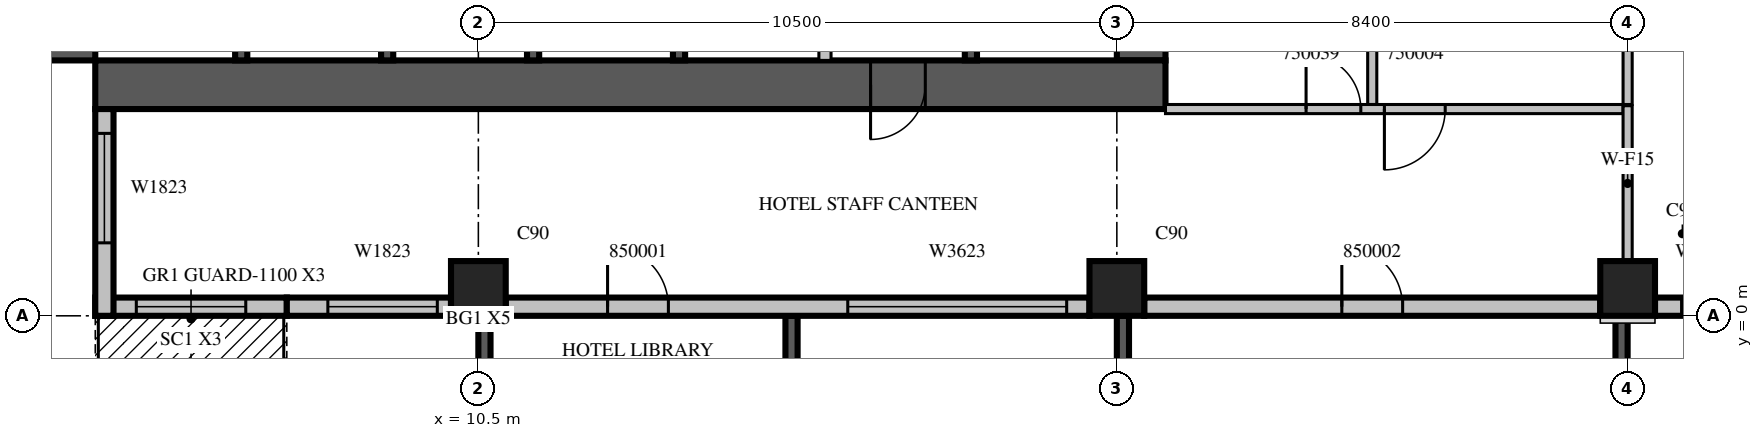
"""IFC4 building model, lengths in metres.
Left out: names, types, materials, properties, quantities, classifications, styles, units other than length and angle.
Written with IfcOpenShell. Run it as: python <this file> out.ifc"""

import sys

from ifc_helpers import new_model, si_unit, direction, frame, frame_2d, origin, origin_2d, place, context, subcontext, project, spatial, rectangle, extrude, source, transform, mapped, element, fill, save


model = new_model("IFC4")
c1 = context("Model", 3, precision=1e-05, world=origin(), true_north=direction((0.0, 1.0)))
c2 = subcontext(c1, "Body", "Model", "MODEL_VIEW")
j1 = project(units=[si_unit("LENGTHUNIT", "METRE"), si_unit("PLANEANGLEUNIT", "RADIAN")], contexts=[c1])
p1 = place(None, origin())
s1 = spatial("IfcSite", under=j1, at=p1, CompositionType="ELEMENT")
p2 = place(p1, origin())
s2 = spatial("IfcBuilding", under=s1, at=p2, CompositionType="ELEMENT")
p3 = place(p2, frame((0.0, 0.0, 223.4)))
s3 = spatial("IfcBuildingStorey", under=s2, at=p3, CompositionType="ELEMENT", Elevation=223.4)
m1 = source(origin(), c2, "Body", "SweptSolid", [
    extrude(rectangle(XDim=0.9, YDim=0.9, at=origin_2d()), origin(), (0.0, 0.0, 1.0), 3.8),
])
for number, where, z_axis, x_axis in (
    (1, (10.5, 0.45, 0.0), (0.0, 0.0, 1.0), (1.0, 0.0, 0.0)),
    (2, (21.0, 0.45, 0.0), (0.0, 0.0, 1.0), (1.0, 0.0, 0.0)),
    (3, (29.4, 0.45, 0.0), (0.0, 0.0, 1.0), (1.0, 0.0, 0.0)),
):
    element("IfcColumn", number, at=place(p3, frame(where, z_axis=z_axis, x_axis=x_axis)), inside=s3, PredefinedType="COLUMN", context=c2, shape_type="MappedRepresentation", body=[
        mapped(m1, transform((0.0, 0.0, 0.0), scale=1.0)),
    ])
m2 = source(origin(), c2, "Body", "SweptSolid", [
    extrude(rectangle(XDim=17.6, YDim=0.8, at=frame_2d((8.8, 0.0))), origin(), (0.0, 0.0, 1.0), 3.8),
])
p4 = place(p3, frame((3.8, 4.2, 0.0), z_axis=(0.0, 0.0, 1.0), x_axis=(0.0, 1.0, 0.0)))
e4 = element("IfcWall", 4, at=p4, inside=s3, PredefinedType="SHEAR", context=c2, shape_type="MappedRepresentation", body=[
    mapped(m2, transform((0.0, 0.0, 0.0), scale=1.0)),
])
m3 = source(origin(), c2, "Body", "SweptSolid", [
    extrude(rectangle(XDim=2.2, YDim=2.1, at=frame_2d((1.1, 1.05))), frame((0.0, 0.41, 0.0), z_axis=(0.0, -1.0, 0.0), x_axis=(1.0, 0.0, 0.0)), (0.0, 0.0, 1.0), 0.82),
])
p5 = place(p4, frame((4.2, 0.0, 0.0)))
e5 = element("IfcOpeningElement", 5, at=p5, cuts=e4, PredefinedType="OPENING", context=c2, shape_type="MappedRepresentation", body=[
    mapped(m3, transform((0.0, 0.0, 0.0), scale=1.0)),
])
m4 = source(origin(), c2, "Body", "SweptSolid", [
    extrude(rectangle(XDim=0.9, YDim=2.1, at=frame_2d((0.45, 1.05))), frame((0.0, 0.41, 0.0), z_axis=(0.0, -1.0, 0.0), x_axis=(1.0, 0.0, 0.0)), (0.0, 0.0, 1.0), 0.82),
])
p6 = place(p4, frame((10.95, 0.0, 0.0)))
e6 = element("IfcOpeningElement", 6, at=p6, cuts=e4, PredefinedType="OPENING", context=c2, shape_type="MappedRepresentation", body=[
    mapped(m4, transform((0.0, 0.0, 0.0), scale=1.0)),
])
m5 = source(origin(), c2, "Body", "SweptSolid", [
    extrude(rectangle(XDim=16.8, YDim=0.8, at=frame_2d((8.4, 0.0))), origin(), (0.0, 0.0, 1.0), 3.8),
])
p7 = place(p3, frame((21.4, 4.2, 0.0), z_axis=(0.0, 0.0, 1.0), x_axis=(0.0, 1.0, 0.0)))
e7 = element("IfcWall", 7, at=p7, inside=s3, PredefinedType="SHEAR", context=c2, shape_type="MappedRepresentation", body=[
    mapped(m5, transform((0.0, 0.0, 0.0), scale=1.0)),
])
p8 = place(p7, frame((4.2, 0.0, 0.0)))
e8 = element("IfcOpeningElement", 8, at=p8, cuts=e7, PredefinedType="OPENING", context=c2, shape_type="MappedRepresentation", body=[
    mapped(m3, transform((0.0, 0.0, 0.0), scale=1.0)),
])
m6 = source(origin(), c2, "Body", "SweptSolid", [
    extrude(rectangle(XDim=1.2, YDim=2.1, at=frame_2d((0.6, 1.05))), frame((0.0, 0.41, 0.0), z_axis=(0.0, -1.0, 0.0), x_axis=(1.0, 0.0, 0.0)), (0.0, 0.0, 1.0), 0.82),
])
p9 = place(p7, frame((14.7, 0.0, 0.0)))
e9 = element("IfcOpeningElement", 9, at=p9, cuts=e7, PredefinedType="OPENING", context=c2, shape_type="MappedRepresentation", body=[
    mapped(m6, transform((0.0, 0.0, 0.0), scale=1.0)),
])
p10 = place(p3, frame((4.2, 3.8, 0.0), z_axis=(0.0, 0.0, 1.0), x_axis=(1.0, 0.0, 0.0)))
e10 = element("IfcWall", 10, at=p10, inside=s3, PredefinedType="SHEAR", context=c2, shape_type="MappedRepresentation", body=[
    mapped(m2, transform((0.0, 0.0, 0.0), scale=1.0)),
])
p11 = place(p10, frame((12.75, 0.0, 0.0)))
e11 = element("IfcOpeningElement", 11, at=p11, cuts=e10, PredefinedType="OPENING", context=c2, shape_type="MappedRepresentation", body=[
    mapped(m4, transform((0.0, 0.0, 0.0), scale=1.0)),
])
m7 = source(origin(), c2, "Body", "SweptSolid", [
    extrude(rectangle(XDim=3.9, YDim=0.2, at=frame_2d((1.95, 0.0))), origin(), (0.0, 0.0, 1.0), 3.4),
])
p12 = place(p3, frame((10.6, 0.0, 0.0), z_axis=(0.0, 0.0, 1.0), x_axis=(0.0, -1.0, 0.0)))
e12 = element("IfcWall", 12, at=p12, inside=s3, PredefinedType="SOLIDWALL", context=c2, shape_type="MappedRepresentation", body=[
    mapped(m7, transform((0.0, 0.0, 0.0), scale=1.0)),
])
m8 = source(origin(), c2, "Body", "SweptSolid", [
    extrude(rectangle(XDim=2.4, YDim=2.3, at=frame_2d((1.2, 1.15))), frame((0.0, 0.11, 0.0), z_axis=(0.0, -1.0, 0.0), x_axis=(1.0, 0.0, 0.0)), (0.0, 0.0, 1.0), 0.22),
])
p13 = place(p12, frame((0.75, 0.0, 0.6)))
e13 = element("IfcOpeningElement", 13, at=p13, cuts=e12, PredefinedType="OPENING", context=c2, shape_type="MappedRepresentation", body=[
    mapped(m8, transform((0.0, 0.0, 0.0), scale=1.0)),
])
p14 = place(p3, frame((15.65, 0.0, 0.0), z_axis=(0.0, 0.0, 1.0), x_axis=(0.0, -1.0, 0.0)))
e14 = element("IfcWall", 14, at=p14, inside=s3, PredefinedType="SOLIDWALL", context=c2, shape_type="MappedRepresentation", body=[
    mapped(m7, transform((0.0, 0.0, 0.0), scale=1.0)),
])
p15 = place(p14, frame((0.75, 0.0, 0.6)))
e15 = element("IfcOpeningElement", 15, at=p15, cuts=e14, PredefinedType="OPENING", context=c2, shape_type="MappedRepresentation", body=[
    mapped(m8, transform((0.0, 0.0, 0.0), scale=1.0)),
])
p16 = place(p3, frame((21.1, 0.0, 0.0), z_axis=(0.0, 0.0, 1.0), x_axis=(0.0, -1.0, 0.0)))
e16 = element("IfcWall", 16, at=p16, inside=s3, PredefinedType="SOLIDWALL", context=c2, shape_type="MappedRepresentation", body=[
    mapped(m7, transform((0.0, 0.0, 0.0), scale=1.0)),
])
p17 = place(p16, frame((0.75, 0.0, 0.6)))
e17 = element("IfcOpeningElement", 17, at=p17, cuts=e16, PredefinedType="OPENING", context=c2, shape_type="MappedRepresentation", body=[
    mapped(m8, transform((0.0, 0.0, 0.0), scale=1.0)),
])
p18 = place(p3, frame((29.3, 0.0, 0.0), z_axis=(0.0, 0.0, 1.0), x_axis=(0.0, -1.0, 0.0)))
e18 = element("IfcWall", 18, at=p18, inside=s3, PredefinedType="SOLIDWALL", context=c2, shape_type="MappedRepresentation", body=[
    mapped(m7, transform((0.0, 0.0, 0.0), scale=1.0)),
])
p19 = place(p18, frame((0.75, 0.0, 0.6)))
e19 = element("IfcOpeningElement", 19, at=p19, cuts=e18, PredefinedType="OPENING", context=c2, shape_type="MappedRepresentation", body=[
    mapped(m8, transform((0.0, 0.0, 0.0), scale=1.0)),
])
m9 = source(origin(), c2, "Body", "SweptSolid", [
    extrude(rectangle(XDim=3.15, YDim=0.3, at=frame_2d((1.575, 0.0))), origin(), (0.0, 0.0, 1.0), 3.4),
])
p20 = place(p3, frame((4.2, 0.15, 0.0), z_axis=(0.0, 0.0, 1.0), x_axis=(1.0, 0.0, 0.0)))
e20 = element("IfcWall", 20, at=p20, inside=s3, PredefinedType="STANDARD", context=c2, shape_type="MappedRepresentation", body=[
    mapped(m9, transform((0.0, 0.0, 0.0), scale=1.0)),
])
m10 = source(origin(), c2, "Body", "SweptSolid", [
    extrude(rectangle(XDim=1.8, YDim=2.4, at=frame_2d((0.9, 1.2))), frame((0.0, 0.16, 0.0), z_axis=(0.0, -1.0, 0.0), x_axis=(1.0, 0.0, 0.0)), (0.0, 0.0, 1.0), 0.32),
])
p21 = place(p20, frame((0.675, 0.0, 0.0)))
e21 = element("IfcOpeningElement", 21, at=p21, cuts=e20, PredefinedType="OPENING", context=c2, shape_type="MappedRepresentation", body=[
    mapped(m10, transform((0.0, 0.0, 0.0), scale=1.0)),
])
m11 = source(origin(), c2, "Body", "SweptSolid", [
    extrude(rectangle(XDim=2.7, YDim=0.3, at=frame_2d((1.35, 0.0))), origin(), (0.0, 0.0, 1.0), 3.4),
])
p22 = place(p3, frame((7.35, 0.15, 0.0), z_axis=(0.0, 0.0, 1.0), x_axis=(1.0, 0.0, 0.0)))
e22 = element("IfcWall", 22, at=p22, inside=s3, PredefinedType="STANDARD", context=c2, shape_type="MappedRepresentation", body=[
    mapped(m11, transform((0.0, 0.0, 0.0), scale=1.0)),
])
m12 = source(origin(), c2, "Body", "SweptSolid", [
    extrude(rectangle(XDim=1.8, YDim=2.3, at=frame_2d((0.9, 1.15))), frame((0.0, 0.16, 0.0), z_axis=(0.0, -1.0, 0.0), x_axis=(1.0, 0.0, 0.0)), (0.0, 0.0, 1.0), 0.32),
])
p23 = place(p22, frame((0.675, 0.0, 0.6)))
e23 = element("IfcOpeningElement", 23, at=p23, cuts=e22, PredefinedType="OPENING", context=c2, shape_type="MappedRepresentation", body=[
    mapped(m12, transform((0.0, 0.0, 0.0), scale=1.0)),
])
m13 = source(origin(), c2, "Body", "SweptSolid", [
    extrude(rectangle(XDim=9.6, YDim=0.3, at=frame_2d((4.8, 0.0))), origin(), (0.0, 0.0, 1.0), 3.4),
])
p24 = place(p3, frame((10.95, 0.15, 0.0), z_axis=(0.0, 0.0, 1.0), x_axis=(1.0, 0.0, 0.0)))
e24 = element("IfcWall", 24, at=p24, inside=s3, PredefinedType="STANDARD", context=c2, shape_type="MappedRepresentation", body=[
    mapped(m13, transform((0.0, 0.0, 0.0), scale=1.0)),
])
m14 = source(origin(), c2, "Body", "SweptSolid", [
    extrude(rectangle(XDim=3.6, YDim=2.3, at=frame_2d((1.8, 1.15))), frame((0.0, 0.16, 0.0), z_axis=(0.0, -1.0, 0.0), x_axis=(1.0, 0.0, 0.0)), (0.0, 0.0, 1.0), 0.32),
])
p25 = place(p24, frame((5.625, 0.0, 0.6)))
e25 = element("IfcOpeningElement", 25, at=p25, cuts=e24, PredefinedType="OPENING", context=c2, shape_type="MappedRepresentation", body=[
    mapped(m14, transform((0.0, 0.0, 0.0), scale=1.0)),
])
m15 = source(origin(), c2, "Body", "SweptSolid", [
    extrude(rectangle(XDim=1.0, YDim=2.1, at=frame_2d((0.5, 1.05))), frame((0.0, 0.16, 0.0), z_axis=(0.0, -1.0, 0.0), x_axis=(1.0, 0.0, 0.0)), (0.0, 0.0, 1.0), 0.32),
])
p26 = place(p24, frame((1.675, 0.0, 0.0)))
e26 = element("IfcOpeningElement", 26, at=p26, cuts=e24, PredefinedType="OPENING", context=c2, shape_type="MappedRepresentation", body=[
    mapped(m15, transform((0.0, 0.0, 0.0), scale=1.0)),
])
m16 = source(origin(), c2, "Body", "SweptSolid", [
    extrude(rectangle(XDim=7.5, YDim=0.3, at=frame_2d((3.75, 0.0))), origin(), (0.0, 0.0, 1.0), 3.4),
])
p27 = place(p3, frame((21.45, 0.15, 0.0), z_axis=(0.0, 0.0, 1.0), x_axis=(1.0, 0.0, 0.0)))
e27 = element("IfcWall", 27, at=p27, inside=s3, PredefinedType="STANDARD", context=c2, shape_type="MappedRepresentation", body=[
    mapped(m16, transform((0.0, 0.0, 0.0), scale=1.0)),
])
p28 = place(p27, frame((3.25, 0.0, 0.0)))
e28 = element("IfcOpeningElement", 28, at=p28, cuts=e27, PredefinedType="OPENING", context=c2, shape_type="MappedRepresentation", body=[
    mapped(m15, transform((0.0, 0.0, 0.0), scale=1.0)),
])
p29 = place(p3, frame((29.85, 0.15, 0.0), z_axis=(0.0, 0.0, 1.0), x_axis=(1.0, 0.0, 0.0)))
e29 = element("IfcWall", 29, at=p29, inside=s3, PredefinedType="STANDARD", context=c2, shape_type="MappedRepresentation", body=[
    mapped(m16, transform((0.0, 0.0, 0.0), scale=1.0)),
])
m17 = source(origin(), c2, "Body", "SweptSolid", [
    extrude(rectangle(XDim=1.2, YDim=2.3, at=frame_2d((0.6, 1.15))), frame((0.0, 0.16, 0.0), z_axis=(0.0, -1.0, 0.0), x_axis=(1.0, 0.0, 0.0)), (0.0, 0.0, 1.0), 0.32),
])
p30 = place(p29, frame((0.438, 0.0, 0.6)))
e30 = element("IfcOpeningElement", 30, at=p30, cuts=e29, PredefinedType="OPENING", context=c2, shape_type="MappedRepresentation", body=[
    mapped(m17, transform((0.0, 0.0, 0.0), scale=1.0)),
])
p31 = place(p29, frame((5.963, 0.0, 0.6)))
e31 = element("IfcOpeningElement", 31, at=p31, cuts=e29, PredefinedType="OPENING", context=c2, shape_type="MappedRepresentation", body=[
    mapped(m17, transform((0.0, 0.0, 0.0), scale=1.0)),
])
m18 = source(origin(), c2, "Body", "SweptSolid", [
    extrude(rectangle(XDim=3.4, YDim=0.3, at=frame_2d((1.7, 0.0))), origin(), (0.0, 0.0, 1.0), 3.4),
])
p32 = place(p3, frame((4.35, 3.4, 0.0), z_axis=(0.0, 0.0, 1.0), x_axis=(0.0, -1.0, 0.0)))
e32 = element("IfcWall", 32, at=p32, inside=s3, PredefinedType="STANDARD", context=c2, shape_type="MappedRepresentation", body=[
    mapped(m18, transform((0.0, 0.0, 0.0), scale=1.0)),
])
p33 = place(p32, frame((0.4, 0.0, 0.6)))
e33 = element("IfcOpeningElement", 33, at=p33, cuts=e32, PredefinedType="OPENING", context=c2, shape_type="MappedRepresentation", body=[
    mapped(m12, transform((0.0, 0.0, 0.0), scale=1.0)),
])
m19 = source(origin(), c2, "Body", "SweptSolid", [
    extrude(rectangle(XDim=3.1, YDim=0.2, at=frame_2d((1.55, 0.0))), origin(), (0.0, 0.0, 1.0), 3.8),
])
for number, where, z_axis, x_axis in (
    (34, (6.6, 4.2, 0.0), (0.0, 0.0, 1.0), (0.0, 1.0, 0.0)),
    (35, (9.0, 4.2, 0.0), (0.0, 0.0, 1.0), (0.0, 1.0, 0.0)),
    (36, (11.4, 4.2, 0.0), (0.0, 0.0, 1.0), (0.0, 1.0, 0.0)),
):
    element("IfcWall", number, at=place(p3, frame(where, z_axis=z_axis, x_axis=x_axis)), inside=s3, PredefinedType="SOLIDWALL", context=c2, shape_type="MappedRepresentation", body=[
        mapped(m19, transform((0.0, 0.0, 0.0), scale=1.0)),
    ])
m20 = source(origin(), c2, "Body", "SweptSolid", [
    extrude(rectangle(XDim=3.1, YDim=0.2, at=frame_2d((1.55, 0.0))), origin(), (0.0, 0.0, 1.0), 3.4),
])
for number, where, z_axis, x_axis in (
    (37, (13.8, 4.2, 0.0), (0.0, 0.0, 1.0), (0.0, 1.0, 0.0)),
    (38, (18.6, 4.2, 0.0), (0.0, 0.0, 1.0), (0.0, 1.0, 0.0)),
):
    element("IfcWall", number, at=place(p3, frame(where, z_axis=z_axis, x_axis=x_axis)), inside=s3, PredefinedType="SOLIDWALL", context=c2, shape_type="MappedRepresentation", body=[
        mapped(m20, transform((0.0, 0.0, 0.0), scale=1.0)),
    ])
m21 = source(origin(), c2, "Body", "SweptSolid", [
    extrude(rectangle(XDim=3.1, YDim=0.2, at=frame_2d((1.55, 0.0))), origin(), (0.0, 0.0, 1.0), 3.4),
])
p34 = place(p3, frame((16.2, 4.2, 0.0), z_axis=(0.0, 0.0, 1.0), x_axis=(0.0, 1.0, 0.0)))
e39 = element("IfcWall", 39, at=p34, inside=s3, PredefinedType="PARTITIONING", context=c2, shape_type="MappedRepresentation", body=[
    mapped(m21, transform((0.0, 0.0, 0.0), scale=1.0)),
])
m22 = source(origin(), c2, "Body", "SweptSolid", [
    extrude(rectangle(XDim=11.525, YDim=0.15, at=frame_2d((5.763, 0.0))), origin(), (0.0, 0.0, 1.0), 3.4),
])
p35 = place(p3, frame((25.2, 15.0, 0.0), z_axis=(0.0, 0.0, 1.0), x_axis=(0.0, -1.0, 0.0)))
e40 = element("IfcWall", 40, at=p35, inside=s3, PredefinedType="PARTITIONING", context=c2, shape_type="MappedRepresentation", body=[
    mapped(m22, transform((0.0, 0.0, 0.0), scale=1.0)),
])
m23 = source(origin(), c2, "Body", "SweptSolid", [
    extrude(rectangle(XDim=0.9, YDim=2.1, at=frame_2d((0.45, 1.05))), frame((0.0, 0.085, 0.0), z_axis=(0.0, -1.0, 0.0), x_axis=(1.0, 0.0, 0.0)), (0.0, 0.0, 1.0), 0.17),
])
p36 = place(p35, frame((7.562, 0.0, 0.0)))
e41 = element("IfcOpeningElement", 41, at=p36, cuts=e40, PredefinedType="OPENING", context=c2, shape_type="MappedRepresentation", body=[
    mapped(m23, transform((0.0, 0.0, 0.0), scale=1.0)),
])
p37 = place(p35, frame((0.925, 0.0, 0.0)))
e42 = element("IfcOpeningElement", 42, at=p37, cuts=e40, PredefinedType="OPENING", context=c2, shape_type="MappedRepresentation", body=[
    mapped(m23, transform((0.0, 0.0, 0.0), scale=1.0)),
])
m24 = source(origin(), c2, "Body", "SweptSolid", [
    extrude(rectangle(XDim=6.576, YDim=0.15, at=frame_2d((3.288, 0.0))), origin(), (0.0, 0.0, 1.0), 3.4),
])
p38 = place(p3, frame((29.4, 3.475, 0.0), z_axis=(0.0, 0.0, 1.0), x_axis=(0.0, 1.0, 0.0)))
e43 = element("IfcWall", 43, at=p38, inside=s3, PredefinedType="PARTITIONING", context=c2, shape_type="MappedRepresentation", body=[
    mapped(m24, transform((0.0, 0.0, 0.0), scale=1.0)),
])
m25 = source(origin(), c2, "Body", "SweptSolid", [
    extrude(rectangle(XDim=7.525, YDim=0.15, at=frame_2d((3.763, 0.0))), origin(), (0.0, 0.0, 1.0), 3.4),
])
p39 = place(p3, frame((21.8, 3.4, 0.0), z_axis=(0.0, 0.0, 1.0), x_axis=(1.0, 0.0, 0.0)))
e44 = element("IfcWall", 44, at=p39, inside=s3, PredefinedType="PARTITIONING", context=c2, shape_type="MappedRepresentation", body=[
    mapped(m25, transform((0.0, 0.0, 0.0), scale=1.0)),
])
m26 = source(origin(), c2, "Body", "SweptSolid", [
    extrude(rectangle(XDim=1.0, YDim=2.1, at=frame_2d((0.5, 1.05))), frame((0.0, 0.085, 0.0), z_axis=(0.0, -1.0, 0.0), x_axis=(1.0, 0.0, 0.0)), (0.0, 0.0, 1.0), 0.17),
])
p40 = place(p39, frame((3.6, 0.0, 0.0)))
e45 = element("IfcOpeningElement", 45, at=p40, cuts=e44, PredefinedType="OPENING", context=c2, shape_type="MappedRepresentation", body=[
    mapped(m26, transform((0.0, 0.0, 0.0), scale=1.0)),
])
p41 = place(p39, frame((2.312, 0.0, 0.0)))
e46 = element("IfcOpeningElement", 46, at=p41, cuts=e44, PredefinedType="OPENING", context=c2, shape_type="MappedRepresentation", body=[
    mapped(m23, transform((0.0, 0.0, 0.0), scale=1.0)),
])
m27 = source(origin(), c2, "Body", "SweptSolid", [
    extrude(rectangle(XDim=2.556, YDim=0.15, at=frame_2d((1.278, 0.0))), origin(), (0.0, 0.0, 1.0), 3.4),
])
p42 = place(p3, frame((29.4, 0.899, 0.0), z_axis=(0.0, 0.0, 1.0), x_axis=(0.0, 1.0, 0.0)))
e47 = element("IfcWall", 47, at=p42, inside=s3, PredefinedType="PARTITIONING", context=c2, shape_type="MappedRepresentation", body=[
    mapped(m27, transform((0.0, 0.0, 0.0), scale=1.0)),
])
m28 = source(origin(), c2, "Body", "SweptSolid", [
    extrude(rectangle(XDim=1.8, YDim=2.4, at=frame_2d((0.9, 1.2))), frame((0.0, 0.025, 0.0), z_axis=(0.0, -1.0, 0.0), x_axis=(1.0, 0.0, 0.0)), (0.0, 0.0, 1.0), 0.05),
])
p43 = place(p21, origin())
e48 = element("IfcDoor", 48, at=p43, inside=s3, OperationType="SLIDING_TO_LEFT", PredefinedType="DOOR", context=c2, shape_type="MappedRepresentation", body=[
    mapped(m28, transform((0.0, 0.0, 0.0), scale=1.0)),
])
fill(e21, e48)
m29 = source(origin(), c2, "Body", "SweptSolid", [
    extrude(rectangle(XDim=1.8, YDim=2.3, at=frame_2d((0.9, 1.15))), frame((0.0, 0.03, 0.0), z_axis=(0.0, -1.0, 0.0), x_axis=(1.0, 0.0, 0.0)), (0.0, 0.0, 1.0), 0.06),
])
p44 = place(p23, origin())
e49 = element("IfcWindow", 49, at=p44, inside=s3, PartitioningType="SINGLE_PANEL", PredefinedType="WINDOW", context=c2, shape_type="MappedRepresentation", body=[
    mapped(m29, transform((0.0, 0.0, 0.0), scale=1.0)),
])
fill(e23, e49)
m30 = source(origin(), c2, "Body", "SweptSolid", [
    extrude(rectangle(XDim=3.6, YDim=2.3, at=frame_2d((1.8, 1.15))), frame((0.0, 0.03, 0.0), z_axis=(0.0, -1.0, 0.0), x_axis=(1.0, 0.0, 0.0)), (0.0, 0.0, 1.0), 0.06),
])
p45 = place(p25, origin())
e50 = element("IfcWindow", 50, at=p45, inside=s3, PartitioningType="SINGLE_PANEL", PredefinedType="WINDOW", context=c2, shape_type="MappedRepresentation", body=[
    mapped(m30, transform((0.0, 0.0, 0.0), scale=1.0)),
])
fill(e25, e50)
m31 = source(origin(), c2, "Body", "SweptSolid", [
    extrude(rectangle(XDim=1.2, YDim=2.3, at=frame_2d((0.6, 1.15))), frame((0.0, 0.03, 0.0), z_axis=(0.0, -1.0, 0.0), x_axis=(1.0, 0.0, 0.0)), (0.0, 0.0, 1.0), 0.06),
])
p46 = place(p30, origin())
e51 = element("IfcWindow", 51, at=p46, inside=s3, PartitioningType="SINGLE_PANEL", PredefinedType="WINDOW", context=c2, shape_type="MappedRepresentation", body=[
    mapped(m31, transform((0.0, 0.0, 0.0), scale=1.0)),
])
fill(e30, e51)
p47 = place(p33, origin())
e52 = element("IfcWindow", 52, at=p47, inside=s3, PartitioningType="SINGLE_PANEL", PredefinedType="WINDOW", context=c2, shape_type="MappedRepresentation", body=[
    mapped(m29, transform((0.0, 0.0, 0.0), scale=1.0)),
])
fill(e33, e52)
m32 = source(origin(), c2, "Body", "SweptSolid", [
    extrude(rectangle(XDim=0.9, YDim=2.1, at=frame_2d((0.45, 1.05))), frame((0.0, 0.025, 0.0), z_axis=(0.0, -1.0, 0.0), x_axis=(1.0, 0.0, 0.0)), (0.0, 0.0, 1.0), 0.05),
])
p48 = place(p11, origin())
e53 = element("IfcDoor", 53, at=p48, inside=s3, OperationType="SINGLE_SWING_RIGHT", PredefinedType="DOOR", context=c2, shape_type="MappedRepresentation", body=[
    mapped(m32, transform((0.0, 0.0, 0.0), scale=1.0)),
])
fill(e11, e53)
m33 = source(origin(), c2, "Body", "SweptSolid", [
    extrude(rectangle(XDim=1.0, YDim=2.1, at=frame_2d((0.5, 1.05))), frame((0.0, 0.025, 0.0), z_axis=(0.0, -1.0, 0.0), x_axis=(1.0, 0.0, 0.0)), (0.0, 0.0, 1.0), 0.05),
])
p49 = place(p40, origin())
e54 = element("IfcDoor", 54, at=p49, inside=s3, OperationType="SINGLE_SWING_RIGHT", PredefinedType="DOOR", context=c2, shape_type="MappedRepresentation", body=[
    mapped(m33, transform((0.0, 0.0, 0.0), scale=1.0)),
])
fill(e45, e54)
p50 = place(p41, origin())
e55 = element("IfcDoor", 55, at=p50, inside=s3, OperationType="SINGLE_SWING_LEFT", PredefinedType="DOOR", context=c2, shape_type="MappedRepresentation", body=[
    mapped(m32, transform((0.0, 0.0, 0.0), scale=1.0)),
])
fill(e46, e55)
p51 = place(p26, origin())
e56 = element("IfcDoor", 56, at=p51, inside=s3, OperationType="SINGLE_SWING_LEFT", PredefinedType="DOOR", context=c2, shape_type="MappedRepresentation", body=[
    mapped(m33, transform((0.0, 0.0, 0.0), scale=1.0)),
])
fill(e26, e56)
p52 = place(p28, origin())
e57 = element("IfcDoor", 57, at=p52, inside=s3, OperationType="SINGLE_SWING_LEFT", PredefinedType="DOOR", context=c2, shape_type="MappedRepresentation", body=[
    mapped(m33, transform((0.0, 0.0, 0.0), scale=1.0)),
])
fill(e28, e57)
save(model, sys.argv[1])
